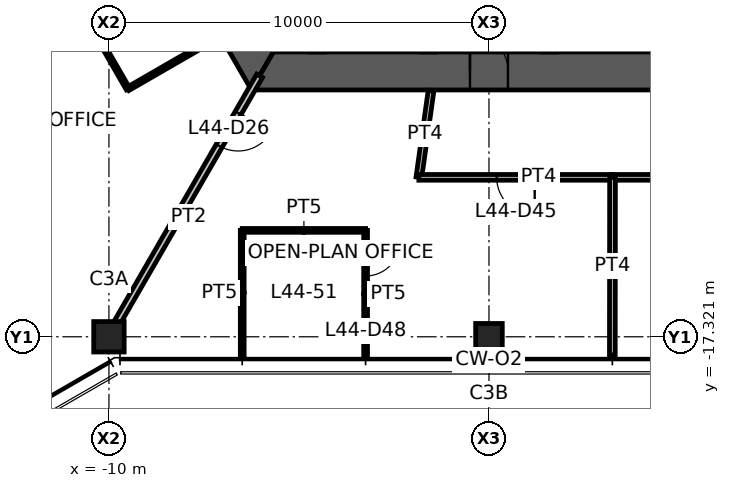
"""IFC4 building model, lengths in metres.
Left out: names, types, materials, properties, quantities, classifications, styles, units other than length and angle.
Written with IfcOpenShell. Run it as: python <this file> out.ifc"""

import sys

from ifc_helpers import new_model, si_unit, direction, frame, frame_2d, origin, origin_2d, place, context, subcontext, project, spatial, polyline, rectangle, hollow_rectangle, outline, extrude, element, fill, save


model = new_model("IFC4")
c1 = context("Model", 3, precision=1e-05, world=origin(), true_north=direction((0.0, 1.0)))
c2 = subcontext(c1, "Body", "Model", "MODEL_VIEW")
j1 = project(units=[si_unit("LENGTHUNIT", "METRE"), si_unit("PLANEANGLEUNIT", "RADIAN")], contexts=[c1])
p1 = place(None, origin())
s1 = spatial("IfcSite", under=j1, at=p1, CompositionType="ELEMENT")
p2 = place(p1, origin())
s2 = spatial("IfcBuilding", under=s1, at=p2, CompositionType="ELEMENT")
p3 = place(p2, frame((0.0, 0.0, 176.0)))
s3 = spatial("IfcBuildingStorey", under=s2, at=p3, CompositionType="ELEMENT", Elevation=176.0)
p4 = place(p3, frame((-10.0, -17.321, 0.0), z_axis=(0.0, 0.0, 1.0), x_axis=(1.0, 0.0, 0.0)))
e1 = element("IfcColumn", 1, at=p4, inside=s3, PredefinedType="COLUMN", context=c2, shape_type="SweptSolid", body=[
    extrude(hollow_rectangle(XDim=0.8, YDim=0.8, WallThickness=0.045, at=origin_2d()), origin(), (0.0, 0.0, 1.0), 3.9),
])
p5 = place(p3, frame((0.0, -17.321, 0.0), z_axis=(0.0, 0.0, 1.0), x_axis=(1.0, 0.0, 0.0)))
e2 = element("IfcColumn", 2, at=p5, inside=s3, PredefinedType="COLUMN", context=c2, shape_type="SweptSolid", body=[
    extrude(hollow_rectangle(XDim=0.7, YDim=0.7, WallThickness=0.036, at=origin_2d()), origin(), (0.0, 0.0, 1.0), 3.9),
])
p6 = place(p3, frame((-11.922, 0.0, 0.0), z_axis=(0.0, 0.0, 1.0), x_axis=(0.500004296715, -0.866022923061, 0.0)))
e3 = element("IfcWall", 3, at=p6, inside=s3, PredefinedType="SHEAR", context=c2, shape_type="SweptSolid", body=[
    extrude(outline(polyline([(-0.289, -0.5), (6.331, -0.5), (7.131, -0.5), (12.211, -0.5), (11.634, 0.5), (7.131, 0.5), (6.331, 0.5), (0.289, 0.5), (-0.289, -0.5)])), origin(), (0.0, 0.0, 1.0), 3.9),
])
p7 = place(p6, frame((6.331, 0.0, 0.0)))
e4 = element("IfcOpeningElement", 4, at=p7, cuts=e3, PredefinedType="OPENING", context=c2, shape_type="SweptSolid", body=[
    extrude(rectangle(XDim=0.8, YDim=2.1, at=frame_2d((0.4, 1.05))), frame((0.0, 0.51, 0.0), z_axis=(0.0, -1.0, 0.0), x_axis=(1.0, 0.0, 0.0)), (0.0, 0.0, 1.0), 1.02),
])
p8 = place(p3, frame((-5.961, -10.325, 0.0), z_axis=(0.0, 0.0, 1.0), x_axis=(1.0, 0.0, 0.0)))
e5 = element("IfcWall", 5, at=p8, inside=s3, PredefinedType="SHEAR", context=c2, shape_type="SweptSolid", body=[
    extrude(outline(polyline([(-0.289, -0.5), (5.461, -0.5), (6.461, -0.5), (12.211, -0.5), (11.634, 0.5), (6.461, 0.5), (5.461, 0.5), (0.289, 0.5), (-0.289, -0.5)])), origin(), (0.0, 0.0, 1.0), 3.9),
])
p9 = place(p8, frame((5.461, 0.0, 0.0)))
e6 = element("IfcOpeningElement", 6, at=p9, cuts=e5, PredefinedType="OPENING", context=c2, shape_type="SweptSolid", body=[
    extrude(rectangle(XDim=1.0, YDim=2.1, at=frame_2d((0.5, 1.05))), frame((0.0, 0.51, 0.0), z_axis=(0.0, -1.0, 0.0), x_axis=(1.0, 0.0, 0.0)), (0.0, 0.0, 1.0), 1.02),
])
p10 = place(p3, frame((-6.035, -10.453, 0.0), z_axis=(0.0, 0.0, 1.0), x_axis=(-0.499989830942, -0.866031274813, 0.0)))
e7 = element("IfcWall", 7, at=p10, inside=s3, PredefinedType="PARTITIONING", context=c2, shape_type="SweptSolid", body=[
    extrude(rectangle(XDim=7.93, YDim=0.175, at=frame_2d((3.965, 0.0))), origin(), (0.0, 0.0, 1.0), 3.05),
])
p11 = place(p10, frame((1.13, 0.0, 0.0)))
e8 = element("IfcOpeningElement", 8, at=p11, cuts=e7, PredefinedType="OPENING", context=c2, shape_type="SweptSolid", body=[
    extrude(rectangle(XDim=1.0, YDim=2.1, at=frame_2d((0.5, 1.05))), frame((0.0, 0.098, 0.0), z_axis=(0.0, -1.0, 0.0), x_axis=(1.0, 0.0, 0.0)), (0.0, 0.0, 1.0), 0.195),
])
p12 = place(p3, frame((-9.5, -10.796, 0.0), z_axis=(0.0, 0.0, 1.0), x_axis=(-0.499990139034, 0.866031096941, 0.0)))
e9 = element("IfcWall", 9, at=p12, inside=s3, PredefinedType="PARTITIONING", context=c2, shape_type="SweptSolid", body=[
    extrude(rectangle(XDim=3.0, YDim=0.1, at=frame_2d((1.5, 0.0))), origin(), (0.0, 0.0, 1.0), 2.95),
])
p13 = place(p12, frame((1.8, 0.0, 0.0)))
e10 = element("IfcOpeningElement", 10, at=p13, cuts=e9, PredefinedType="OPENING", context=c2, shape_type="SweptSolid", body=[
    extrude(rectangle(XDim=0.9, YDim=2.1, at=frame_2d((0.45, 1.05))), frame((0.0, 0.06, 0.0), z_axis=(0.0, -1.0, 0.0), x_axis=(1.0, 0.0, 0.0)), (0.0, 0.0, 1.0), 0.12),
])
p14 = place(p3, frame((-7.092, -9.406, 0.0), z_axis=(0.0, 0.0, 1.0), x_axis=(-0.86603494908, -0.499983466698, 0.0)))
e11 = element("IfcWall", 11, at=p14, inside=s3, PredefinedType="PARTITIONING", context=c2, shape_type="SweptSolid", body=[
    extrude(rectangle(XDim=2.78, YDim=0.1, at=frame_2d((1.39, 0.0))), origin(), (0.0, 0.0, 1.0), 2.95),
])
p15 = place(p3, frame((7.578, -13.125, 0.0), z_axis=(0.0, 0.0, 1.0), x_axis=(-1.0, 0.0, 0.0)))
e12 = element("IfcWall", 12, at=p15, inside=s3, PredefinedType="PARTITIONING", context=c2, shape_type="SweptSolid", body=[
    extrude(rectangle(XDim=4.336, YDim=0.15, at=frame_2d((2.168, 0.0))), origin(), (0.0, 0.0, 1.0), 2.95),
])
p16 = place(p3, frame((-1.844, -13.125, 0.0), z_axis=(0.0, 0.0, 1.0), x_axis=(0.139119980631, 0.990275532864, 0.0)))
e13 = element("IfcWall", 13, at=p16, inside=s3, PredefinedType="PARTITIONING", context=c2, shape_type="SweptSolid", body=[
    extrude(rectangle(XDim=2.302, YDim=0.15, at=frame_2d((1.151, 0.0))), origin(), (0.0, 0.0, 1.0), 2.95),
])
p17 = place(p3, frame((3.251, -13.125, 0.0), z_axis=(0.0, 0.0, 1.0), x_axis=(-1.0, 0.0, 0.0)))
e14 = element("IfcWall", 14, at=p17, inside=s3, PredefinedType="PARTITIONING", context=c2, shape_type="SweptSolid", body=[
    extrude(rectangle(XDim=5.096, YDim=0.15, at=frame_2d((2.548, 0.0))), origin(), (0.0, 0.0, 1.0), 2.95),
])
p18 = place(p17, frame((2.048, 0.0, 0.0)))
e15 = element("IfcOpeningElement", 15, at=p18, cuts=e14, PredefinedType="OPENING", context=c2, shape_type="SweptSolid", body=[
    extrude(rectangle(XDim=1.0, YDim=2.1, at=frame_2d((0.5, 1.05))), frame((0.0, 0.085, 0.0), z_axis=(0.0, -1.0, 0.0), x_axis=(1.0, 0.0, 0.0)), (0.0, 0.0, 1.0), 0.17),
])
p19 = place(p3, frame((-6.493, -17.801, 0.0), z_axis=(0.0, 0.0, 1.0), x_axis=(0.0, 1.0, 0.0)))
e16 = element("IfcWall", 16, at=p19, inside=s3, PredefinedType="PARTITIONING", context=c2, shape_type="SweptSolid", body=[
    extrude(rectangle(XDim=3.28, YDim=0.1, at=frame_2d((1.64, 0.0))), origin(), (0.0, 0.0, 1.0), 2.95),
])
p20 = place(p3, frame((-6.493, -14.521, 0.0), z_axis=(0.0, 0.0, 1.0), x_axis=(1.0, 0.0, 0.0)))
e17 = element("IfcWall", 17, at=p20, inside=s3, PredefinedType="PARTITIONING", context=c2, shape_type="SweptSolid", body=[
    extrude(rectangle(XDim=3.247, YDim=0.1, at=frame_2d((1.623, 0.0))), origin(), (0.0, 0.0, 1.0), 2.95),
])
p21 = place(p3, frame((-3.246, -14.521, 0.0), z_axis=(0.0, 0.0, 1.0), x_axis=(0.0, -1.0, 0.0)))
e18 = element("IfcWall", 18, at=p21, inside=s3, PredefinedType="PARTITIONING", context=c2, shape_type="SweptSolid", body=[
    extrude(rectangle(XDim=3.33, YDim=0.1, at=frame_2d((1.665, 0.0))), origin(), (0.0, 0.0, 1.0), 2.95),
])
p22 = place(p21, frame((0.3, 0.0, 0.0)))
e19 = element("IfcOpeningElement", 19, at=p22, cuts=e18, PredefinedType="OPENING", context=c2, shape_type="SweptSolid", body=[
    extrude(rectangle(XDim=0.9, YDim=2.1, at=frame_2d((0.45, 1.05))), frame((0.0, 0.06, 0.0), z_axis=(0.0, -1.0, 0.0), x_axis=(1.0, 0.0, 0.0)), (0.0, 0.0, 1.0), 0.12),
])
p23 = place(p3, frame((3.246, -17.801, 0.0), z_axis=(0.0, 0.0, 1.0), x_axis=(0.001096662352, 0.999999398666, 0.0)))
e20 = element("IfcWall", 20, at=p23, inside=s3, PredefinedType="PARTITIONING", context=c2, shape_type="SweptSolid", body=[
    extrude(rectangle(XDim=4.675, YDim=0.15, at=frame_2d((2.337, 0.0))), origin(), (0.0, 0.0, 1.0), 2.95),
])
p24 = place(p9, origin())
e21 = element("IfcDoor", 21, at=p24, inside=s3, OperationType="SINGLE_SWING_LEFT", PredefinedType="DOOR", context=c2, shape_type="SweptSolid", body=[
    extrude(rectangle(XDim=1.0, YDim=2.1, at=frame_2d((0.5, 1.05))), frame((0.0, 0.025, 0.0), z_axis=(0.0, -1.0, 0.0), x_axis=(1.0, 0.0, 0.0)), (0.0, 0.0, 1.0), 0.05),
])
fill(e6, e21)
p25 = place(p11, origin())
e22 = element("IfcDoor", 22, at=p25, inside=s3, OperationType="SINGLE_SWING_LEFT", PredefinedType="DOOR", context=c2, shape_type="SweptSolid", body=[
    extrude(rectangle(XDim=1.0, YDim=2.1, at=frame_2d((0.5, 1.05))), frame((0.0, 0.025, 0.0), z_axis=(0.0, -1.0, 0.0), x_axis=(1.0, 0.0, 0.0)), (0.0, 0.0, 1.0), 0.05),
])
fill(e8, e22)
p26 = place(p18, origin())
e23 = element("IfcDoor", 23, at=p26, inside=s3, OperationType="SINGLE_SWING_LEFT", PredefinedType="DOOR", context=c2, shape_type="SweptSolid", body=[
    extrude(rectangle(XDim=1.0, YDim=2.1, at=frame_2d((0.5, 1.05))), frame((0.0, 0.025, 0.0), z_axis=(0.0, -1.0, 0.0), x_axis=(1.0, 0.0, 0.0)), (0.0, 0.0, 1.0), 0.05),
])
fill(e15, e23)
p27 = place(p22, origin())
e24 = element("IfcDoor", 24, at=p27, inside=s3, OperationType="SINGLE_SWING_LEFT", PredefinedType="DOOR", context=c2, shape_type="SweptSolid", body=[
    extrude(rectangle(XDim=0.9, YDim=2.1, at=frame_2d((0.45, 1.05))), frame((0.0, 0.025, 0.0), z_axis=(0.0, -1.0, 0.0), x_axis=(1.0, 0.0, 0.0)), (0.0, 0.0, 1.0), 0.05),
])
fill(e19, e24)
save(model, sys.argv[1])
